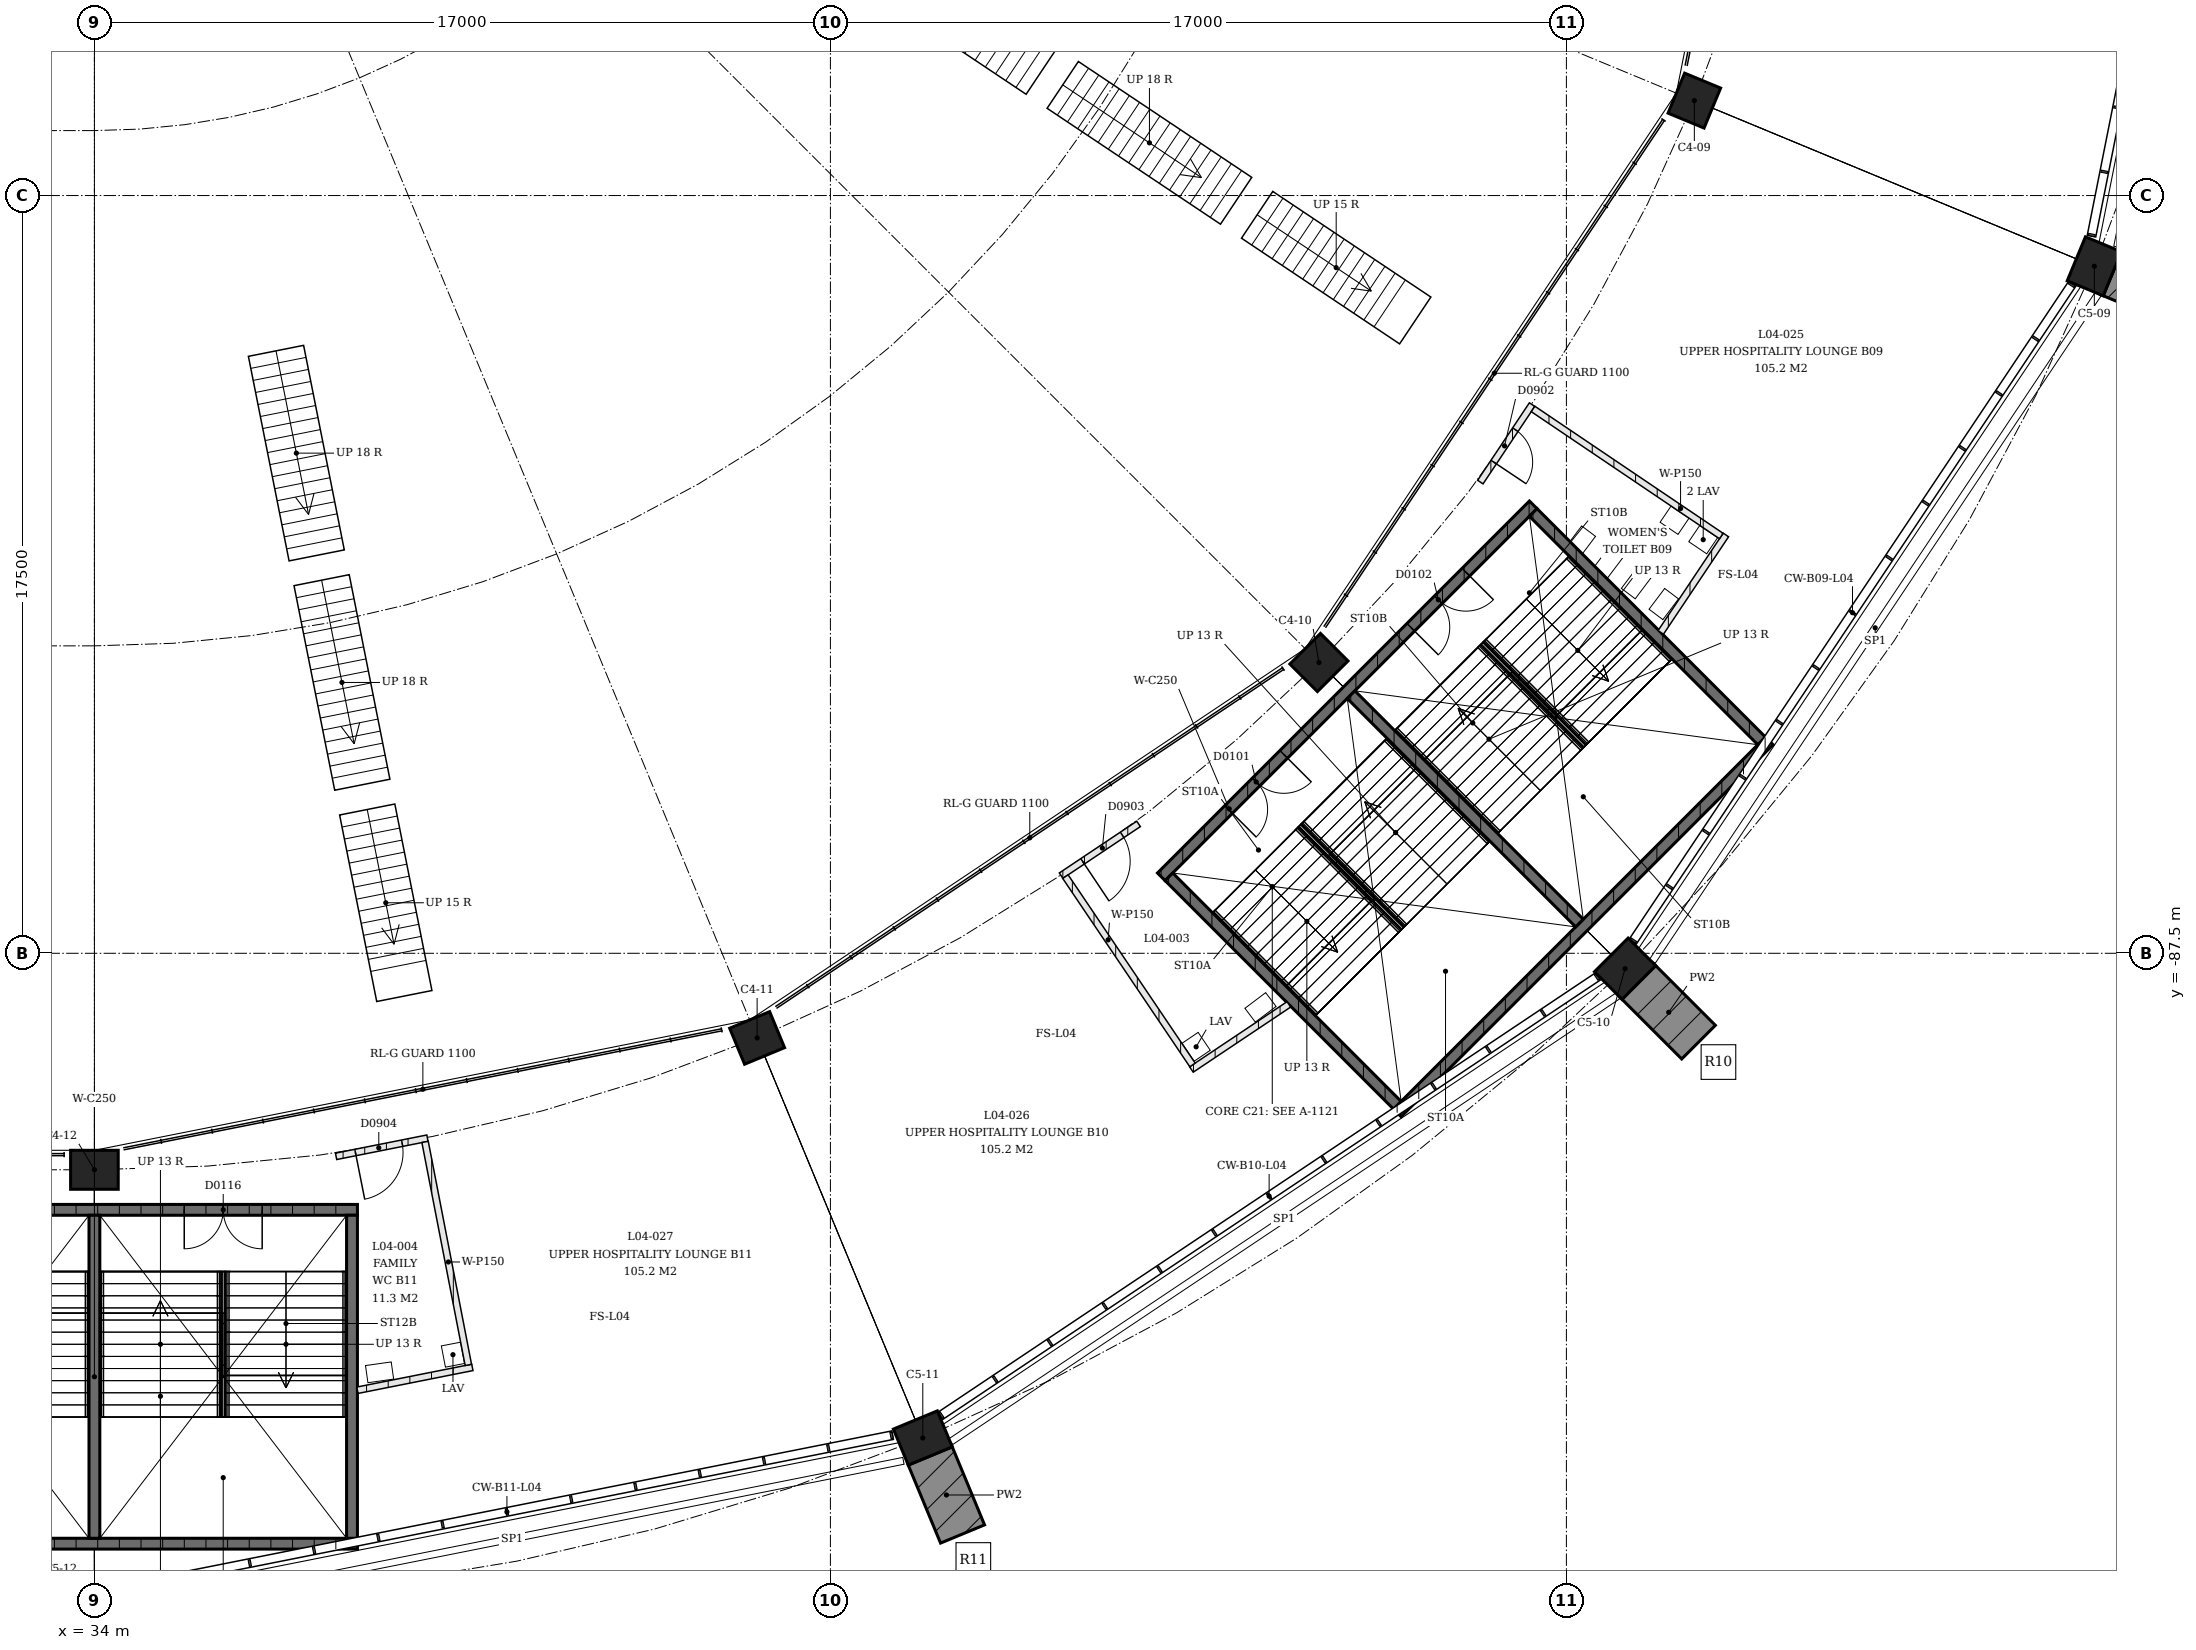
"""IFC4 building model, lengths in metres.
Left out: names, types, materials, properties, quantities, classifications, styles, units other than length and angle.
Written with IfcOpenShell. Run it as: python <this file> out.ifc"""

import sys

from ifc_helpers import new_model, si_unit, direction, frame, frame_2d, origin, origin_2d, place, context, subcontext, project, spatial, rectangle, extrude, element, fill, save


model = new_model("IFC4")
c1 = context("Model", 3, precision=1e-05, world=origin(), true_north=direction((0.0, 1.0)))
c2 = subcontext(c1, "Body", "Model", "MODEL_VIEW")
j1 = project(units=[si_unit("LENGTHUNIT", "METRE"), si_unit("PLANEANGLEUNIT", "RADIAN")], contexts=[c1])
p1 = place(None, origin())
s1 = spatial("IfcSite", under=j1, at=p1, CompositionType="ELEMENT")
p2 = place(p1, origin())
s2 = spatial("IfcBuilding", under=s1, at=p2, CompositionType="ELEMENT")
p3 = place(p2, frame((0.0, 0.0, 18.0)))
s3 = spatial("IfcBuildingStorey", under=s2, at=p3, CompositionType="ELEMENT", Elevation=18.0)
p4 = place(p3, frame((70.955, -67.807, 0.0), z_axis=(0.0, 0.0, 1.0), x_axis=(0.382683432365, 0.923879532511, 0.0)))
e1 = element("IfcColumn", 1, at=p4, inside=s3, PredefinedType="COLUMN", context=c2, shape_type="SweptSolid", body=[
    extrude(rectangle(XDim=1.0, YDim=0.9, at=origin_2d()), origin(), (0.0, 0.0, 1.0), 4.5),
])
p5 = place(p3, frame((80.194, -71.634, 0.0), z_axis=(0.0, 0.0, 1.0), x_axis=(0.382683432365, 0.923879532511, 0.0)))
e2 = element("IfcColumn", 2, at=p5, inside=s3, PredefinedType="COLUMN", context=c2, shape_type="SweptSolid", body=[
    extrude(rectangle(XDim=1.1, YDim=0.9, at=origin_2d()), origin(), (0.0, 0.0, 1.0), 4.5),
])
p6 = place(p3, frame((62.284, -80.784, 0.0), z_axis=(0.0, 0.0, 1.0), x_axis=(0.707106781187, 0.707106781187, 0.0)))
e3 = element("IfcColumn", 3, at=p6, inside=s3, PredefinedType="COLUMN", context=c2, shape_type="SweptSolid", body=[
    extrude(rectangle(XDim=1.0, YDim=0.9, at=origin_2d()), origin(), (0.0, 0.0, 1.0), 4.5),
])
p7 = place(p3, frame((69.355, -87.855, 0.0), z_axis=(0.0, 0.0, 1.0), x_axis=(0.707106781187, 0.707106781187, 0.0)))
e4 = element("IfcColumn", 4, at=p7, inside=s3, PredefinedType="COLUMN", context=c2, shape_type="SweptSolid", body=[
    extrude(rectangle(XDim=1.1, YDim=0.9, at=origin_2d()), origin(), (0.0, 0.0, 1.0), 4.5),
])
p8 = place(p3, frame((49.307, -89.455, 0.0), z_axis=(0.0, 0.0, 1.0), x_axis=(0.923879532511, 0.382683432365, 0.0)))
e5 = element("IfcColumn", 5, at=p8, inside=s3, PredefinedType="COLUMN", context=c2, shape_type="SweptSolid", body=[
    extrude(rectangle(XDim=1.0, YDim=0.9, at=origin_2d()), origin(), (0.0, 0.0, 1.0), 4.5),
])
for number, where, z_axis, x_axis in (
    (6, (53.134, -98.694, 0.0), (0.0, 0.0, 1.0), (0.924, 0.383, 0.0)),
    (7, (34.0, -92.5, 0.0), (0.0, 0.0, 1.0), (1.0, 0.0, 0.0)),
):
    element("IfcColumn", number, at=place(p3, frame(where, z_axis=z_axis, x_axis=x_axis)), inside=s3, PredefinedType="COLUMN", context=c2, shape_type="SweptSolid", body=[
        extrude(rectangle(XDim=1.1, YDim=0.9, at=origin_2d()), origin(), (0.0, 0.0, 1.0), 4.5),
    ])
p9 = place(p3, frame((58.643, -85.734, 0.0), z_axis=(0.0, 0.0, 1.0), x_axis=(0.707106781187, 0.707106781187, 0.0)))
e8 = element("IfcWall", 8, at=p9, inside=s3, PredefinedType="SHEAR", context=c2, shape_type="SweptSolid", body=[
    extrude(rectangle(XDim=12.15, YDim=0.25, at=frame_2d((6.075, 0.0))), origin(), (0.0, 0.0, 1.0), 4.09),
])
p10 = place(p9, frame((2.2, 0.0, 0.0)))
e9 = element("IfcOpeningElement", 9, at=p10, cuts=e8, PredefinedType="OPENING", context=c2, shape_type="SweptSolid", body=[
    extrude(rectangle(XDim=1.8, YDim=2.1, at=frame_2d((0.9, 1.05))), frame((0.0, 0.125, 0.0), z_axis=(0.0, -1.0, 0.0), x_axis=(1.0, 0.0, 0.0)), (0.0, 0.0, 1.0), 0.25),
])
p11 = place(p9, frame((8.15, 0.0, 0.0)))
e10 = element("IfcOpeningElement", 10, at=p11, cuts=e8, PredefinedType="OPENING", context=c2, shape_type="SweptSolid", body=[
    extrude(rectangle(XDim=1.8, YDim=2.1, at=frame_2d((0.9, 1.05))), frame((0.0, 0.125, 0.0), z_axis=(0.0, -1.0, 0.0), x_axis=(1.0, 0.0, 0.0)), (0.0, 0.0, 1.0), 0.25),
])
p12 = place(p3, frame((64.094, -91.186, 0.0), z_axis=(0.0, 0.0, 1.0), x_axis=(0.707106781187, 0.707106781187, 0.0)))
e11 = element("IfcWall", 11, at=p12, inside=s3, PredefinedType="SHEAR", context=c2, shape_type="SweptSolid", body=[
    extrude(rectangle(XDim=12.15, YDim=0.25, at=frame_2d((6.075, 0.0))), origin(), (0.0, 0.0, 1.0), 4.09),
])
for number, where, z_axis, x_axis in (
    (12, (58.819, -85.734, 0.0), (0.0, 0.0, 1.0), (0.707, -0.707, 0.0)),
    (13, (67.234, -77.319, 0.0), (0.0, 0.0, 1.0), (0.707, -0.707, 0.0)),
):
    element("IfcWall", number, at=place(p3, frame(where, z_axis=z_axis, x_axis=x_axis)), inside=s3, PredefinedType="SHEAR", context=c2, shape_type="SweptSolid", body=[
        extrude(rectangle(XDim=7.46, YDim=0.25, at=frame_2d((3.73, 0.0))), origin(), (0.0, 0.0, 1.0), 4.09),
    ])
p13 = place(p3, frame((63.027, -81.527, 0.0), z_axis=(0.0, 0.0, 1.0), x_axis=(0.707106781187, -0.707106781187, 0.0)))
e14 = element("IfcWall", 14, at=p13, inside=s3, PredefinedType="SHEAR", context=c2, shape_type="SweptSolid", body=[
    extrude(rectangle(XDim=7.46, YDim=0.25, at=frame_2d((3.73, 0.0))), origin(), (0.0, 0.0, 1.0), 4.09),
])
p14 = place(p3, frame((27.925, -93.425, 0.0), z_axis=(0.0, 0.0, 1.0), x_axis=(1.0, 0.0, 0.0)))
e15 = element("IfcWall", 15, at=p14, inside=s3, PredefinedType="SHEAR", context=c2, shape_type="SweptSolid", body=[
    extrude(rectangle(XDim=12.15, YDim=0.25, at=frame_2d((6.075, 0.0))), origin(), (0.0, 0.0, 1.0), 4.09),
])
p15 = place(p14, frame((2.2, 0.0, 0.0)))
e16 = element("IfcOpeningElement", 16, at=p15, cuts=e15, PredefinedType="OPENING", context=c2, shape_type="SweptSolid", body=[
    extrude(rectangle(XDim=1.8, YDim=2.1, at=frame_2d((0.9, 1.05))), frame((0.0, 0.125, 0.0), z_axis=(0.0, -1.0, 0.0), x_axis=(1.0, 0.0, 0.0)), (0.0, 0.0, 1.0), 0.25),
])
p16 = place(p14, frame((8.15, 0.0, 0.0)))
e17 = element("IfcOpeningElement", 17, at=p16, cuts=e15, PredefinedType="OPENING", context=c2, shape_type="SweptSolid", body=[
    extrude(rectangle(XDim=1.8, YDim=2.1, at=frame_2d((0.9, 1.05))), frame((0.0, 0.125, 0.0), z_axis=(0.0, -1.0, 0.0), x_axis=(1.0, 0.0, 0.0)), (0.0, 0.0, 1.0), 0.25),
])
p17 = place(p3, frame((27.925, -101.135, 0.0), z_axis=(0.0, 0.0, 1.0), x_axis=(1.0, 0.0, 0.0)))
e18 = element("IfcWall", 18, at=p17, inside=s3, PredefinedType="SHEAR", context=c2, shape_type="SweptSolid", body=[
    extrude(rectangle(XDim=12.15, YDim=0.25, at=frame_2d((6.075, 0.0))), origin(), (0.0, 0.0, 1.0), 4.09),
])
for number, where, z_axis, x_axis in (
    (19, (39.95, -93.55, 0.0), (0.0, 0.0, 1.0), (0.0, -1.0, 0.0)),
    (20, (34.0, -93.55, 0.0), (0.0, 0.0, 1.0), (0.0, -1.0, 0.0)),
):
    element("IfcWall", number, at=place(p3, frame(where, z_axis=z_axis, x_axis=x_axis)), inside=s3, PredefinedType="SHEAR", context=c2, shape_type="SweptSolid", body=[
        extrude(rectangle(XDim=7.46, YDim=0.25, at=frame_2d((3.73, 0.0))), origin(), (0.0, 0.0, 1.0), 4.09),
    ])
p18 = place(p3, frame((66.012, -76.618, 0.0), z_axis=(0.0, 0.0, 1.0), x_axis=(0.555616271849, 0.831438848297, 0.0)))
e21 = element("IfcWall", 21, at=p18, inside=s3, PredefinedType="PARTITIONING", context=c2, shape_type="SweptSolid", body=[
    extrude(rectangle(XDim=2.152, YDim=0.15, at=frame_2d((1.076, 0.0))), origin(), (0.0, 0.0, 1.0), 3.0),
])
p19 = place(p18, frame((0.556, 0.0, 0.0)))
e22 = element("IfcOpeningElement", 22, at=p19, cuts=e21, PredefinedType="OPENING", context=c2, shape_type="SweptSolid", body=[
    extrude(rectangle(XDim=0.9, YDim=2.1, at=frame_2d((0.45, 1.05))), frame((0.0, 0.075, 0.0), z_axis=(0.0, -1.0, 0.0), x_axis=(1.0, 0.0, 0.0)), (0.0, 0.0, 1.0), 0.15),
])
p20 = place(p3, frame((70.18, -80.089, 0.0), z_axis=(0.0, 0.0, 1.0), x_axis=(0.555553352943, 0.831480890961, 0.0)))
e23 = element("IfcWall", 23, at=p20, inside=s3, PredefinedType="PARTITIONING", context=c2, shape_type="SweptSolid", body=[
    extrude(rectangle(XDim=2.707, YDim=0.15, at=frame_2d((1.353, 0.0))), origin(), (0.0, 0.0, 1.0), 3.0),
])
p21 = place(p3, frame((67.229, -74.928, 0.0), z_axis=(0.0, 0.0, 1.0), x_axis=(0.8288583832, -0.559458470843, 0.0)))
e24 = element("IfcWall", 24, at=p21, inside=s3, PredefinedType="PARTITIONING", context=c2, shape_type="SweptSolid", body=[
    extrude(rectangle(XDim=5.247, YDim=0.15, at=frame_2d((2.624, 0.0))), origin(), (0.0, 0.0, 1.0), 3.0),
])
p22 = place(p3, frame((58.118, -84.512, 0.0), z_axis=(0.0, 0.0, 1.0), x_axis=(-0.831438848297, -0.555616271849, 0.0)))
e25 = element("IfcWall", 25, at=p22, inside=s3, PredefinedType="PARTITIONING", context=c2, shape_type="SweptSolid", body=[
    extrude(rectangle(XDim=2.152, YDim=0.15, at=frame_2d((1.076, 0.0))), origin(), (0.0, 0.0, 1.0), 3.0),
])
p23 = place(p22, frame((0.456, 0.0, 0.0)))
e26 = element("IfcOpeningElement", 26, at=p23, cuts=e25, PredefinedType="OPENING", context=c2, shape_type="SweptSolid", body=[
    extrude(rectangle(XDim=1.1, YDim=2.1, at=frame_2d((0.55, 1.05))), frame((0.0, 0.075, 0.0), z_axis=(0.0, -1.0, 0.0), x_axis=(1.0, 0.0, 0.0)), (0.0, 0.0, 1.0), 0.15),
])
p24 = place(p3, frame((61.589, -88.68, 0.0), z_axis=(0.0, 0.0, 1.0), x_axis=(-0.831480890961, -0.555553352943, 0.0)))
e27 = element("IfcWall", 27, at=p24, inside=s3, PredefinedType="PARTITIONING", context=c2, shape_type="SweptSolid", body=[
    extrude(rectangle(XDim=2.707, YDim=0.15, at=frame_2d((1.353, 0.0))), origin(), (0.0, 0.0, 1.0), 3.0),
])
p25 = place(p3, frame((56.428, -85.729, 0.0), z_axis=(0.0, 0.0, 1.0), x_axis=(0.559458470843, -0.8288583832, 0.0)))
e28 = element("IfcWall", 28, at=p25, inside=s3, PredefinedType="PARTITIONING", context=c2, shape_type="SweptSolid", body=[
    extrude(rectangle(XDim=5.247, YDim=0.15, at=frame_2d((2.624, 0.0))), origin(), (0.0, 0.0, 1.0), 3.0),
])
p26 = place(p3, frame((39.582, -92.19, 0.0), z_axis=(0.0, 0.0, 1.0), x_axis=(0.980776540228, 0.195134256702, 0.0)))
e29 = element("IfcWall", 29, at=p26, inside=s3, PredefinedType="PARTITIONING", context=c2, shape_type="SweptSolid", body=[
    extrude(rectangle(XDim=2.152, YDim=0.15, at=frame_2d((1.076, 0.0))), origin(), (0.0, 0.0, 1.0), 3.0),
])
p27 = place(p26, frame((0.456, 0.0, 0.0)))
e30 = element("IfcOpeningElement", 30, at=p27, cuts=e29, PredefinedType="OPENING", context=c2, shape_type="SweptSolid", body=[
    extrude(rectangle(XDim=1.1, YDim=2.1, at=frame_2d((0.55, 1.05))), frame((0.0, 0.075, 0.0), z_axis=(0.0, -1.0, 0.0), x_axis=(1.0, 0.0, 0.0)), (0.0, 0.0, 1.0), 0.15),
])
p28 = place(p3, frame((40.075, -97.592, 0.0), z_axis=(0.0, 0.0, 1.0), x_axis=(0.980781382465, 0.195109917251, 0.0)))
e31 = element("IfcWall", 31, at=p28, inside=s3, PredefinedType="PARTITIONING", context=c2, shape_type="SweptSolid", body=[
    extrude(rectangle(XDim=2.707, YDim=0.15, at=frame_2d((1.353, 0.0))), origin(), (0.0, 0.0, 1.0), 3.0),
])
p29 = place(p3, frame((41.638, -91.856, 0.0), z_axis=(0.0, 0.0, 1.0), x_axis=(0.190529669063, -0.981681437742, 0.0)))
e32 = element("IfcWall", 32, at=p29, inside=s3, PredefinedType="PARTITIONING", context=c2, shape_type="SweptSolid", body=[
    extrude(rectangle(XDim=5.247, YDim=0.15, at=frame_2d((2.624, 0.0))), origin(), (0.0, 0.0, 1.0), 3.0),
])
p30 = place(p10, origin())
e33 = element("IfcDoor", 33, at=p30, inside=s3, OperationType="DOUBLE_DOOR_SINGLE_SWING", PredefinedType="DOOR", context=c2, shape_type="SweptSolid", body=[
    extrude(rectangle(XDim=1.8, YDim=2.1, at=frame_2d((0.9, 1.05))), frame((0.0, 0.025, 0.0), z_axis=(0.0, -1.0, 0.0), x_axis=(1.0, 0.0, 0.0)), (0.0, 0.0, 1.0), 0.05),
])
fill(e9, e33)
p31 = place(p11, origin())
e34 = element("IfcDoor", 34, at=p31, inside=s3, OperationType="DOUBLE_DOOR_SINGLE_SWING", PredefinedType="DOOR", context=c2, shape_type="SweptSolid", body=[
    extrude(rectangle(XDim=1.8, YDim=2.1, at=frame_2d((0.9, 1.05))), frame((0.0, 0.025, 0.0), z_axis=(0.0, -1.0, 0.0), x_axis=(1.0, 0.0, 0.0)), (0.0, 0.0, 1.0), 0.05),
])
fill(e10, e34)
p32 = place(p16, origin())
e35 = element("IfcDoor", 35, at=p32, inside=s3, OperationType="DOUBLE_DOOR_SINGLE_SWING", PredefinedType="DOOR", context=c2, shape_type="SweptSolid", body=[
    extrude(rectangle(XDim=1.8, YDim=2.1, at=frame_2d((0.9, 1.05))), frame((0.0, 0.025, 0.0), z_axis=(0.0, -1.0, 0.0), x_axis=(1.0, 0.0, 0.0)), (0.0, 0.0, 1.0), 0.05),
])
fill(e17, e35)
p33 = place(p19, origin())
e36 = element("IfcDoor", 36, at=p33, inside=s3, OperationType="SINGLE_SWING_LEFT", PredefinedType="DOOR", context=c2, shape_type="SweptSolid", body=[
    extrude(rectangle(XDim=0.9, YDim=2.1, at=frame_2d((0.45, 1.05))), frame((0.0, 0.025, 0.0), z_axis=(0.0, -1.0, 0.0), x_axis=(1.0, 0.0, 0.0)), (0.0, 0.0, 1.0), 0.05),
])
fill(e22, e36)
p34 = place(p23, origin())
e37 = element("IfcDoor", 37, at=p34, inside=s3, OperationType="SINGLE_SWING_LEFT", PredefinedType="DOOR", context=c2, shape_type="SweptSolid", body=[
    extrude(rectangle(XDim=1.1, YDim=2.1, at=frame_2d((0.55, 1.05))), frame((0.0, 0.025, 0.0), z_axis=(0.0, -1.0, 0.0), x_axis=(1.0, 0.0, 0.0)), (0.0, 0.0, 1.0), 0.05),
])
fill(e26, e37)
p35 = place(p27, origin())
e38 = element("IfcDoor", 38, at=p35, inside=s3, OperationType="SINGLE_SWING_LEFT", PredefinedType="DOOR", context=c2, shape_type="SweptSolid", body=[
    extrude(rectangle(XDim=1.1, YDim=2.1, at=frame_2d((0.55, 1.05))), frame((0.0, 0.025, 0.0), z_axis=(0.0, -1.0, 0.0), x_axis=(1.0, 0.0, 0.0)), (0.0, 0.0, 1.0), 0.05),
])
fill(e30, e38)
save(model, sys.argv[1])
